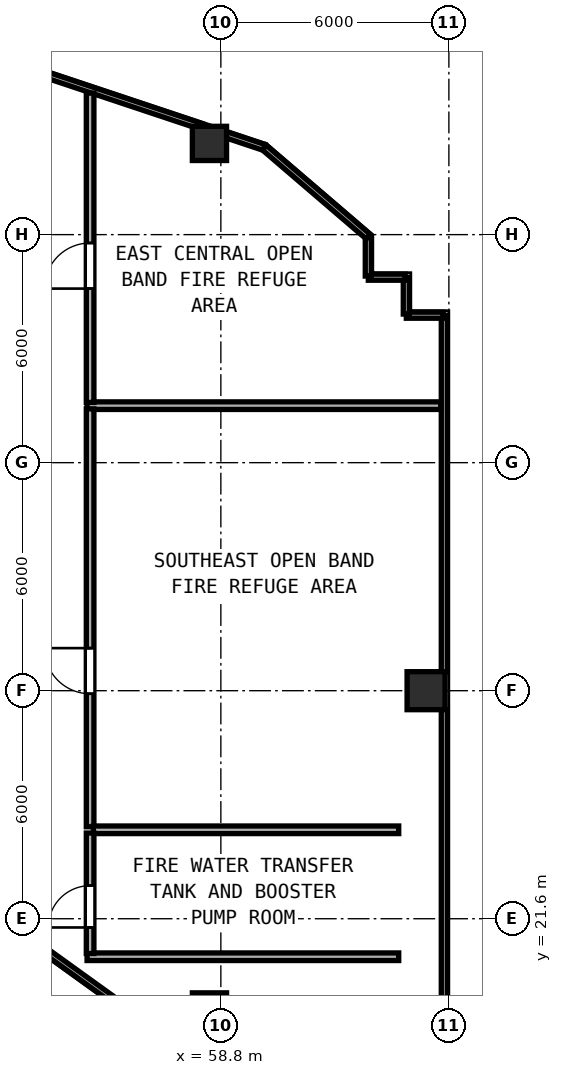
"""IFC4 building model, lengths in metres.
Left out: names, types, materials, properties, quantities, classifications, styles, units other than length and angle.
Written with IfcOpenShell. Run it as: python <this file> out.ifc"""

import sys

from ifc_helpers import new_model, si_unit, direction, frame, frame_2d, origin, origin_2d, place, context, subcontext, project, spatial, rectangle, hollow_rectangle, extrude, element, fill, save


model = new_model("IFC4")
c1 = context("Model", 3, precision=1e-05, world=origin(), true_north=direction((0.0, 1.0)))
c2 = subcontext(c1, "Body", "Model", "MODEL_VIEW")
j1 = project(units=[si_unit("LENGTHUNIT", "METRE"), si_unit("PLANEANGLEUNIT", "RADIAN")], contexts=[c1])
p1 = place(None, origin())
s1 = spatial("IfcSite", under=j1, at=p1, CompositionType="ELEMENT")
p2 = place(p1, origin())
s2 = spatial("IfcBuilding", under=s1, at=p2, CompositionType="ELEMENT")
p3 = place(p2, frame((0.0, 0.0, 136.4)))
s3 = spatial("IfcBuildingStorey", under=s2, at=p3, CompositionType="ELEMENT", Elevation=136.4)
p4 = place(p3, frame((64.2, 27.6, 0.0), z_axis=(0.0, 0.0, 1.0), x_axis=(1.0, 0.0, 0.0)))
e1 = element("IfcColumn", 1, at=p4, inside=s3, PredefinedType="COLUMN", context=c2, shape_type="SweptSolid", body=[
    extrude(hollow_rectangle(XDim=1.0, YDim=1.0, WallThickness=0.038, at=origin_2d()), origin(), (0.0, 0.0, 1.0), 4.6),
])
for number, where, z_axis, x_axis in (
    (2, (58.5, 19.2, 0.0), (0.0, 0.0, 1.0), (1.0, 0.0, 0.0)),
    (3, (58.5, 42.0, 0.0), (0.0, 0.0, 1.0), (1.0, 0.0, 0.0)),
):
    element("IfcColumn", number, at=place(p3, frame(where, z_axis=z_axis, x_axis=x_axis)), inside=s3, PredefinedType="COLUMN", context=c2, shape_type="SweptSolid", body=[
        extrude(hollow_rectangle(XDim=0.9, YDim=0.9, WallThickness=0.034, at=origin_2d()), origin(), (0.0, 0.0, 1.0), 4.6),
    ])
p5 = place(p3, frame((53.292, 21.394, 0.0), z_axis=(0.0, 0.0, 1.0), x_axis=(0.811535942642, -0.584302501963, 0.0)))
e4 = element("IfcWall", 4, at=p5, inside=s3, PredefinedType="PARAPET", context=c2, shape_type="SweptSolid", body=[
    extrude(rectangle(XDim=11.568, YDim=0.16, at=frame_2d((5.784, 0.0))), origin(), (0.0, 0.0, 1.0), 1.15),
])
p6 = place(p3, frame((64.68, 17.292, 0.0), z_axis=(0.0, 0.0, 1.0), x_axis=(0.0, 1.0, 0.0)))
e5 = element("IfcWall", 5, at=p6, inside=s3, PredefinedType="PARAPET", context=c2, shape_type="SweptSolid", body=[
    extrude(rectangle(XDim=9.816, YDim=0.16, at=frame_2d((4.908, 0.0))), origin(), (0.0, 0.0, 1.0), 1.15),
])
p7 = place(p3, frame((64.68, 28.092, 0.0), z_axis=(0.0, 0.0, 1.0), x_axis=(0.0, 1.0, 0.0)))
e6 = element("IfcWall", 6, at=p7, inside=s3, PredefinedType="PARAPET", context=c2, shape_type="SweptSolid", body=[
    extrude(rectangle(XDim=9.388, YDim=0.16, at=frame_2d((4.694, 0.0))), origin(), (0.0, 0.0, 1.0), 1.15),
])
for number, where, z_axis, x_axis in (
    (7, (64.65, 37.48, 0.0), (0.0, 0.0, 1.0), (-1.0, 0.0, 0.0)),
    (8, (63.68, 37.51, 0.0), (0.0, 0.0, 1.0), (0.0, 1.0, 0.0)),
    (9, (63.65, 38.48, 0.0), (0.0, 0.0, 1.0), (-1.0, 0.0, 0.0)),
):
    element("IfcWall", number, at=place(p3, frame(where, z_axis=z_axis, x_axis=x_axis)), inside=s3, PredefinedType="PARAPET", context=c2, shape_type="SweptSolid", body=[
        extrude(rectangle(XDim=0.97, YDim=0.16, at=frame_2d((0.485, 0.0))), origin(), (0.0, 0.0, 1.0), 1.15),
    ])
p8 = place(p3, frame((62.68, 38.51, 0.0), z_axis=(0.0, 0.0, 1.0), x_axis=(0.0, 1.0, 0.0)))
e10 = element("IfcWall", 10, at=p8, inside=s3, PredefinedType="PARAPET", context=c2, shape_type="SweptSolid", body=[
    extrude(rectangle(XDim=1.035, YDim=0.16, at=frame_2d((0.518, 0.0))), origin(), (0.0, 0.0, 1.0), 1.15),
])
p9 = place(p3, frame((62.68, 39.545, 0.0), z_axis=(0.0, 0.0, 1.0), x_axis=(-0.759275702513, 0.650769089289, 0.0)))
e11 = element("IfcWall", 11, at=p9, inside=s3, PredefinedType="PARAPET", context=c2, shape_type="SweptSolid", body=[
    extrude(rectangle(XDim=3.609, YDim=0.16, at=frame_2d((1.805, 0.0))), origin(), (0.0, 0.0, 1.0), 1.15),
])
p10 = place(p3, frame((59.94, 41.894, 0.0), z_axis=(0.0, 0.0, 1.0), x_axis=(-0.948636865667, 0.316367029093, 0.0)))
e12 = element("IfcWall", 12, at=p10, inside=s3, PredefinedType="PARAPET", context=c2, shape_type="SweptSolid", body=[
    extrude(rectangle(XDim=1.052, YDim=0.16, at=frame_2d((0.526, 0.0))), origin(), (0.0, 0.0, 1.0), 1.15),
])
p11 = place(p3, frame((58.295, 42.442, 0.0), z_axis=(0.0, 0.0, 1.0), x_axis=(-0.948683298051, 0.316227766017, 0.0)))
e13 = element("IfcWall", 13, at=p11, inside=s3, PredefinedType="PARAPET", context=c2, shape_type="SweptSolid", body=[
    extrude(rectangle(XDim=5.918, YDim=0.16, at=frame_2d((2.959, 0.0))), origin(), (0.0, 0.0, 1.0), 1.15),
])
p12 = place(p3, frame((55.28, 35.1, 0.0), z_axis=(0.0, 0.0, 1.0), x_axis=(1.0, 0.0, 0.0)))
e14 = element("IfcWall", 14, at=p12, inside=s3, PredefinedType="SOLIDWALL", context=c2, shape_type="SweptSolid", body=[
    extrude(rectangle(XDim=9.308, YDim=0.2, at=frame_2d((4.654, 0.0))), origin(), (0.0, 0.0, 1.0), 4.4),
])
p13 = place(p3, frame((55.36, 24.02, 0.0), z_axis=(0.0, 0.0, 1.0), x_axis=(0.0, 1.0, 0.0)))
e15 = element("IfcWall", 15, at=p13, inside=s3, PredefinedType="SOLIDWALL", context=c2, shape_type="SweptSolid", body=[
    extrude(rectangle(XDim=10.995, YDim=0.2, at=frame_2d((5.498, 0.0))), origin(), (0.0, 0.0, 1.0), 4.4),
])
p14 = place(p13, frame((3.5, 0.0, 0.0)))
e16 = element("IfcOpeningElement", 16, at=p14, cuts=e15, PredefinedType="OPENING", context=c2, shape_type="SweptSolid", body=[
    extrude(rectangle(XDim=1.2, YDim=2.15, at=frame_2d((0.6, 1.075))), frame((0.0, 0.11, 0.0), z_axis=(0.0, -1.0, 0.0), x_axis=(1.0, 0.0, 0.0)), (0.0, 0.0, 1.0), 0.22),
])
p15 = place(p3, frame((55.36, 35.185, 0.0), z_axis=(0.0, 0.0, 1.0), x_axis=(0.0, 1.0, 0.0)))
e17 = element("IfcWall", 17, at=p15, inside=s3, PredefinedType="SOLIDWALL", context=c2, shape_type="SweptSolid", body=[
    extrude(rectangle(XDim=8.138, YDim=0.2, at=frame_2d((4.069, 0.0))), origin(), (0.0, 0.0, 1.0), 4.4),
])
p16 = place(p15, frame((2.995, 0.0, 0.0)))
e18 = element("IfcOpeningElement", 18, at=p16, cuts=e17, PredefinedType="OPENING", context=c2, shape_type="SweptSolid", body=[
    extrude(rectangle(XDim=1.2, YDim=2.15, at=frame_2d((0.6, 1.075))), frame((0.0, 0.11, 0.0), z_axis=(0.0, -1.0, 0.0), x_axis=(1.0, 0.0, 0.0)), (0.0, 0.0, 1.0), 0.22),
])
p17 = place(p3, frame((55.445, 23.94, 0.0), z_axis=(0.0, 0.0, 1.0), x_axis=(1.0, 0.0, 0.0)))
e19 = element("IfcWall", 19, at=p17, inside=s3, PredefinedType="SOLIDWALL", context=c2, shape_type="SweptSolid", body=[
    extrude(rectangle(XDim=8.035, YDim=0.2, at=frame_2d((4.018, 0.0))), origin(), (0.0, 0.0, 1.0), 4.4),
])
p18 = place(p3, frame((55.28, 20.6, 0.0), z_axis=(0.0, 0.0, 1.0), x_axis=(1.0, 0.0, 0.0)))
e20 = element("IfcWall", 20, at=p18, inside=s3, PredefinedType="SOLIDWALL", context=c2, shape_type="SweptSolid", body=[
    extrude(rectangle(XDim=8.2, YDim=0.2, at=frame_2d((4.1, 0.0))), origin(), (0.0, 0.0, 1.0), 4.4),
])
p19 = place(p3, frame((55.36, 20.685, 0.0), z_axis=(0.0, 0.0, 1.0), x_axis=(0.0, 1.0, 0.0)))
e21 = element("IfcWall", 21, at=p19, inside=s3, PredefinedType="SOLIDWALL", context=c2, shape_type="SweptSolid", body=[
    extrude(rectangle(XDim=3.17, YDim=0.2, at=frame_2d((1.585, 0.0))), origin(), (0.0, 0.0, 1.0), 4.4),
])
p20 = place(p19, frame((0.685, 0.0, 0.0)))
e22 = element("IfcOpeningElement", 22, at=p20, cuts=e21, PredefinedType="OPENING", context=c2, shape_type="SweptSolid", body=[
    extrude(rectangle(XDim=1.1, YDim=2.15, at=frame_2d((0.55, 1.075))), frame((0.0, 0.11, 0.0), z_axis=(0.0, -1.0, 0.0), x_axis=(1.0, 0.0, 0.0)), (0.0, 0.0, 1.0), 0.22),
])
p21 = place(p14, origin())
e23 = element("IfcDoor", 23, at=p21, inside=s3, OperationType="SINGLE_SWING_RIGHT", PredefinedType="DOOR", context=c2, shape_type="SweptSolid", body=[
    extrude(rectangle(XDim=1.2, YDim=2.15, at=frame_2d((0.6, 1.075))), frame((0.0, 0.025, 0.0), z_axis=(0.0, -1.0, 0.0), x_axis=(1.0, 0.0, 0.0)), (0.0, 0.0, 1.0), 0.05),
])
fill(e16, e23)
p22 = place(p16, origin())
e24 = element("IfcDoor", 24, at=p22, inside=s3, OperationType="SINGLE_SWING_LEFT", PredefinedType="DOOR", context=c2, shape_type="SweptSolid", body=[
    extrude(rectangle(XDim=1.2, YDim=2.15, at=frame_2d((0.6, 1.075))), frame((0.0, 0.025, 0.0), z_axis=(0.0, -1.0, 0.0), x_axis=(1.0, 0.0, 0.0)), (0.0, 0.0, 1.0), 0.05),
])
fill(e18, e24)
p23 = place(p20, origin())
e25 = element("IfcDoor", 25, at=p23, inside=s3, OperationType="SINGLE_SWING_LEFT", PredefinedType="DOOR", context=c2, shape_type="SweptSolid", body=[
    extrude(rectangle(XDim=1.1, YDim=2.15, at=frame_2d((0.55, 1.075))), frame((0.0, 0.025, 0.0), z_axis=(0.0, -1.0, 0.0), x_axis=(1.0, 0.0, 0.0)), (0.0, 0.0, 1.0), 0.05),
])
fill(e22, e25)
save(model, sys.argv[1])
